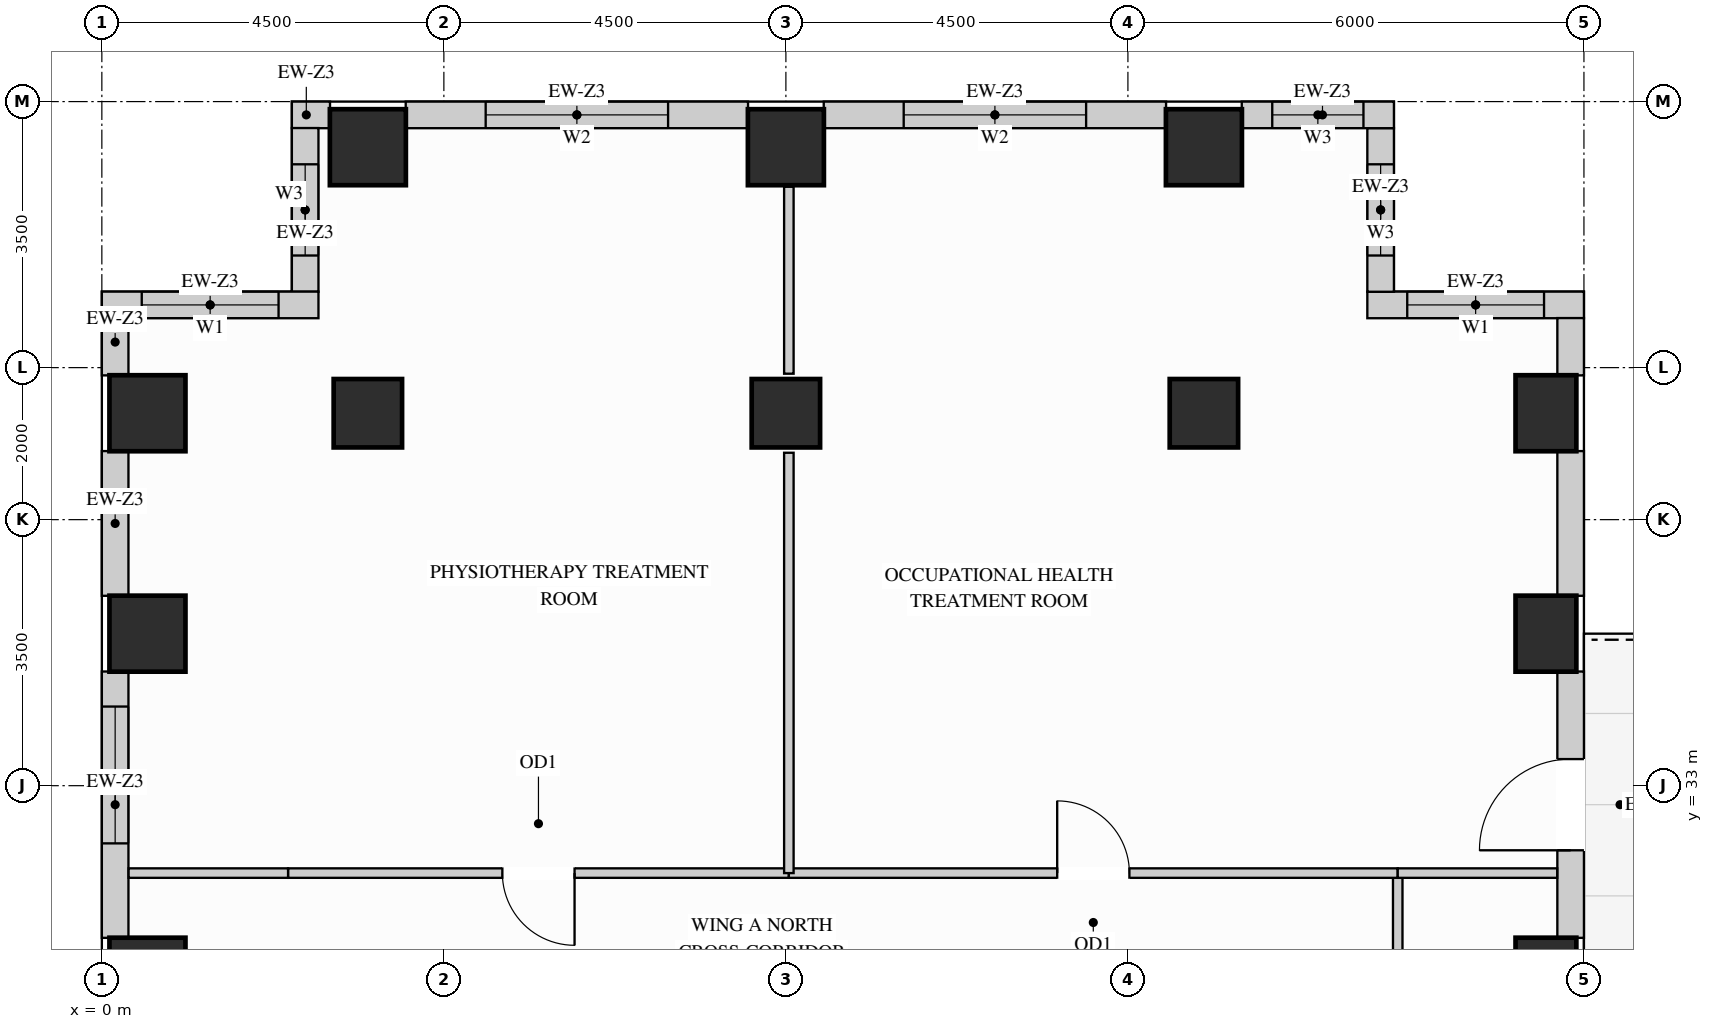
"""IFC4 building model, lengths in metres.
Left out: names, types, materials, properties, quantities, classifications, styles, units other than length and angle.
Written with IfcOpenShell. Run it as: python <this file> out.ifc"""

import sys

from ifc_helpers import new_model, si_unit, direction, frame, frame_2d, origin, origin_2d, place, context, subcontext, project, spatial, rectangle, extrude, source, transform, mapped, element, fill, save


model = new_model("IFC4")
c1 = context("Model", 3, precision=1e-05, world=origin(), true_north=direction((0.0, 1.0)))
c2 = subcontext(c1, "Body", "Model", "MODEL_VIEW")
j1 = project(units=[si_unit("LENGTHUNIT", "METRE"), si_unit("PLANEANGLEUNIT", "RADIAN")], contexts=[c1])
p1 = place(None, origin())
s1 = spatial("IfcSite", under=j1, at=p1, CompositionType="ELEMENT")
p2 = place(p1, origin())
s2 = spatial("IfcBuilding", under=s1, at=p2, CompositionType="ELEMENT")
p3 = place(p2, frame((0.0, 0.0, 157.5)))
s3 = spatial("IfcBuildingStorey", under=s2, at=p3, CompositionType="ELEMENT", Elevation=157.5)
m1 = source(origin(), c2, "Body", "SweptSolid", [
    extrude(rectangle(XDim=0.9, YDim=0.9, at=origin_2d()), origin(), (0.0, 0.0, 1.0), 3.4),
])
for number, where, z_axis, x_axis in (
    (1, (14.5, 37.9, 0.0), (0.0, 0.0, 1.0), (1.0, 0.0, 0.0)),
    (2, (3.5, 37.9, 0.0), (0.0, 0.0, 1.0), (1.0, 0.0, 0.0)),
    (3, (9.0, 37.9, 0.0), (0.0, 0.0, 1.0), (1.0, 0.0, 0.0)),
):
    element("IfcColumn", number, at=place(p3, frame(where, z_axis=z_axis, x_axis=x_axis)), inside=s3, PredefinedType="COLUMN", context=c2, shape_type="MappedRepresentation", body=[
        mapped(m1, transform((0.0, 0.0, 0.0), x_axis=(1.0, 0.0, 0.0), y_axis=(0.0, 1.0, 0.0), z_axis=(0.0, 0.0, 1.0))),
    ])
m2 = source(origin(), c2, "Body", "SweptSolid", [
    extrude(rectangle(XDim=0.8, YDim=1.0, at=origin_2d()), origin(), (0.0, 0.0, 1.0), 3.4),
])
for number, where, z_axis, x_axis in (
    (4, (19.0, 30.5, 0.0), (0.0, 0.0, 1.0), (1.0, 0.0, 0.0)),
    (5, (19.0, 35.0, 0.0), (0.0, 0.0, 1.0), (1.0, 0.0, 0.0)),
    (6, (19.0, 37.9, 0.0), (0.0, 0.0, 1.0), (1.0, 0.0, 0.0)),
):
    element("IfcColumn", number, at=place(p3, frame(where, z_axis=z_axis, x_axis=x_axis)), inside=s3, PredefinedType="COLUMN", context=c2, shape_type="MappedRepresentation", body=[
        mapped(m2, transform((0.0, 0.0, 0.0), x_axis=(1.0, 0.0, 0.0), y_axis=(0.0, 1.0, 0.0), z_axis=(0.0, 0.0, 1.0))),
    ])
m3 = source(origin(), c2, "Body", "SweptSolid", [
    extrude(rectangle(XDim=1.0, YDim=1.0, at=origin_2d()), origin(), (0.0, 0.0, 1.0), 3.4),
])
for number, where, z_axis, x_axis in (
    (7, (14.5, 41.4, 0.0), (0.0, 0.0, 1.0), (1.0, 0.0, 0.0)),
    (8, (3.5, 41.4, 0.0), (0.0, 0.0, 1.0), (1.0, 0.0, 0.0)),
    (9, (9.0, 41.4, 0.0), (0.0, 0.0, 1.0), (1.0, 0.0, 0.0)),
    (10, (0.6, 30.5, 0.0), (0.0, 0.0, 1.0), (1.0, 0.0, 0.0)),
    (11, (0.6, 35.0, 0.0), (0.0, 0.0, 1.0), (1.0, 0.0, 0.0)),
    (12, (0.6, 37.9, 0.0), (0.0, 0.0, 1.0), (1.0, 0.0, 0.0)),
):
    element("IfcColumn", number, at=place(p3, frame(where, z_axis=z_axis, x_axis=x_axis)), inside=s3, PredefinedType="COLUMN", context=c2, shape_type="MappedRepresentation", body=[
        mapped(m3, transform((0.0, 0.0, 0.0), x_axis=(1.0, 0.0, 0.0), y_axis=(0.0, 1.0, 0.0), z_axis=(0.0, 0.0, 1.0))),
    ])
p4 = place(p3, frame((19.5, 39.325, 0.0), z_axis=(0.0, 0.0, 1.0), x_axis=(-1.0, 0.0, 0.0)))
e13 = element("IfcWall", 13, at=p4, inside=s3, PredefinedType="SOLIDWALL", context=c2, shape_type="SweptSolid", body=[
    extrude(rectangle(XDim=2.85, YDim=0.35, at=frame_2d((1.425, 0.0))), origin(), (0.0, 0.0, 1.0), 3.385),
])
p5 = place(p4, frame((0.525, 0.0, 0.78)))
e14 = element("IfcOpeningElement", 14, at=p5, cuts=e13, PredefinedType="OPENING", context=c2, shape_type="SweptSolid", body=[
    extrude(rectangle(XDim=1.8, YDim=2.1, at=frame_2d((0.9, 1.05))), frame((0.0, 0.185, 0.0), z_axis=(0.0, -1.0, 0.0), x_axis=(1.0, 0.0, 0.0)), (0.0, 0.0, 1.0), 0.37),
])
p6 = place(p3, frame((16.825, 39.498, 0.0), z_axis=(0.0, 0.0, 1.0), x_axis=(0.0, 1.0, 0.0)))
e15 = element("IfcWall", 15, at=p6, inside=s3, PredefinedType="SOLIDWALL", context=c2, shape_type="SweptSolid", body=[
    extrude(rectangle(XDim=2.154, YDim=0.35, at=frame_2d((1.077, 0.0))), origin(), (0.0, 0.0, 1.0), 3.385),
])
p7 = place(p6, frame((0.477, 0.0, 0.78)))
e16 = element("IfcOpeningElement", 16, at=p7, cuts=e15, PredefinedType="OPENING", context=c2, shape_type="SweptSolid", body=[
    extrude(rectangle(XDim=1.2, YDim=2.1, at=frame_2d((0.6, 1.05))), frame((0.0, 0.185, 0.0), z_axis=(0.0, -1.0, 0.0), x_axis=(1.0, 0.0, 0.0)), (0.0, 0.0, 1.0), 0.37),
])
p8 = place(p3, frame((17.0, 41.825, 0.0), z_axis=(0.0, 0.0, 1.0), x_axis=(-1.0, 0.0, 0.0)))
e17 = element("IfcWall", 17, at=p8, inside=s3, PredefinedType="SOLIDWALL", context=c2, shape_type="SweptSolid", body=[
    extrude(rectangle(XDim=2.002, YDim=0.35, at=frame_2d((1.001, 0.0))), origin(), (0.0, 0.0, 1.0), 3.385),
])
p9 = place(p8, frame((0.401, 0.0, 0.78)))
e18 = element("IfcOpeningElement", 18, at=p9, cuts=e17, PredefinedType="OPENING", context=c2, shape_type="SweptSolid", body=[
    extrude(rectangle(XDim=1.2, YDim=2.1, at=frame_2d((0.6, 1.05))), frame((0.0, 0.185, 0.0), z_axis=(0.0, -1.0, 0.0), x_axis=(1.0, 0.0, 0.0)), (0.0, 0.0, 1.0), 0.37),
])
p10 = place(p3, frame((14.002, 41.825, 0.0), z_axis=(0.0, 0.0, 1.0), x_axis=(-1.0, 0.0, 0.0)))
e19 = element("IfcWall", 19, at=p10, inside=s3, PredefinedType="SOLIDWALL", context=c2, shape_type="SweptSolid", body=[
    extrude(rectangle(XDim=4.504, YDim=0.35, at=frame_2d((2.252, 0.0))), origin(), (0.0, 0.0, 1.0), 2.612),
])
p11 = place(p10, frame((1.052, 0.0, 0.78)))
e20 = element("IfcOpeningElement", 20, at=p11, cuts=e19, PredefinedType="OPENING", context=c2, shape_type="SweptSolid", body=[
    extrude(rectangle(XDim=2.4, YDim=1.652, at=frame_2d((1.2, 0.826))), frame((0.0, 0.185, 0.0), z_axis=(0.0, -1.0, 0.0), x_axis=(1.0, 0.0, 0.0)), (0.0, 0.0, 1.0), 0.37),
])
p12 = place(p3, frame((8.502, 41.825, 0.0), z_axis=(0.0, 0.0, 1.0), x_axis=(-1.0, 0.0, 0.0)))
e21 = element("IfcWall", 21, at=p12, inside=s3, PredefinedType="SOLIDWALL", context=c2, shape_type="SweptSolid", body=[
    extrude(rectangle(XDim=4.504, YDim=0.35, at=frame_2d((2.252, 0.0))), origin(), (0.0, 0.0, 1.0), 2.612),
])
p13 = place(p12, frame((1.052, 0.0, 0.78)))
e22 = element("IfcOpeningElement", 22, at=p13, cuts=e21, PredefinedType="OPENING", context=c2, shape_type="SweptSolid", body=[
    extrude(rectangle(XDim=2.4, YDim=1.652, at=frame_2d((1.2, 0.826))), frame((0.0, 0.185, 0.0), z_axis=(0.0, -1.0, 0.0), x_axis=(1.0, 0.0, 0.0)), (0.0, 0.0, 1.0), 0.37),
])
m4 = source(origin(), c2, "Body", "SweptSolid", [
    extrude(rectangle(XDim=0.502, YDim=0.35, at=frame_2d((0.251, 0.0))), origin(), (0.0, 0.0, 1.0), 3.385),
])
p14 = place(p3, frame((3.002, 41.825, 0.0), z_axis=(0.0, 0.0, 1.0), x_axis=(-1.0, 0.0, 0.0)))
e23 = element("IfcWall", 23, at=p14, inside=s3, PredefinedType="SOLIDWALL", context=c2, shape_type="MappedRepresentation", body=[
    mapped(m4, transform((0.0, 0.0, 0.0), x_axis=(1.0, 0.0, 0.0), y_axis=(0.0, 1.0, 0.0), z_axis=(0.0, 0.0, 1.0))),
])
p15 = place(p3, frame((2.675, 41.652, 0.0), z_axis=(0.0, 0.0, 1.0), x_axis=(0.0, -1.0, 0.0)))
e24 = element("IfcWall", 24, at=p15, inside=s3, PredefinedType="SOLIDWALL", context=c2, shape_type="SweptSolid", body=[
    extrude(rectangle(XDim=2.154, YDim=0.35, at=frame_2d((1.077, 0.0))), origin(), (0.0, 0.0, 1.0), 3.385),
])
p16 = place(p15, frame((0.477, 0.0, 0.78)))
e25 = element("IfcOpeningElement", 25, at=p16, cuts=e24, PredefinedType="OPENING", context=c2, shape_type="SweptSolid", body=[
    extrude(rectangle(XDim=1.2, YDim=2.1, at=frame_2d((0.6, 1.05))), frame((0.0, 0.185, 0.0), z_axis=(0.0, -1.0, 0.0), x_axis=(1.0, 0.0, 0.0)), (0.0, 0.0, 1.0), 0.37),
])
p17 = place(p3, frame((2.85, 39.325, 0.0), z_axis=(0.0, 0.0, 1.0), x_axis=(-1.0, 0.0, 0.0)))
e26 = element("IfcWall", 26, at=p17, inside=s3, PredefinedType="SOLIDWALL", context=c2, shape_type="SweptSolid", body=[
    extrude(rectangle(XDim=2.85, YDim=0.35, at=frame_2d((1.425, 0.0))), origin(), (0.0, 0.0, 1.0), 3.385),
])
p18 = place(p17, frame((0.525, 0.0, 0.78)))
e27 = element("IfcOpeningElement", 27, at=p18, cuts=e26, PredefinedType="OPENING", context=c2, shape_type="SweptSolid", body=[
    extrude(rectangle(XDim=1.8, YDim=2.1, at=frame_2d((0.9, 1.05))), frame((0.0, 0.185, 0.0), z_axis=(0.0, -1.0, 0.0), x_axis=(1.0, 0.0, 0.0)), (0.0, 0.0, 1.0), 0.37),
])
m5 = source(origin(), c2, "Body", "SweptSolid", [
    extrude(rectangle(XDim=0.754, YDim=0.35, at=frame_2d((0.377, 0.0))), origin(), (0.0, 0.0, 1.0), 3.385),
])
p19 = place(p3, frame((0.175, 39.152, 0.0), z_axis=(0.0, 0.0, 1.0), x_axis=(0.0, -1.0, 0.0)))
e28 = element("IfcWall", 28, at=p19, inside=s3, PredefinedType="SOLIDWALL", context=c2, shape_type="MappedRepresentation", body=[
    mapped(m5, transform((0.0, 0.0, 0.0), x_axis=(1.0, 0.0, 0.0), y_axis=(0.0, 1.0, 0.0), z_axis=(0.0, 0.0, 1.0))),
])
m6 = source(origin(), c2, "Body", "SweptSolid", [
    extrude(rectangle(XDim=1.904, YDim=0.35, at=frame_2d((0.952, 0.0))), origin(), (0.0, 0.0, 1.0), 2.612),
])
p20 = place(p3, frame((0.175, 37.402, 0.0), z_axis=(0.0, 0.0, 1.0), x_axis=(0.0, -1.0, 0.0)))
e29 = element("IfcWall", 29, at=p20, inside=s3, PredefinedType="SOLIDWALL", context=c2, shape_type="MappedRepresentation", body=[
    mapped(m6, transform((0.0, 0.0, 0.0), x_axis=(1.0, 0.0, 0.0), y_axis=(0.0, 1.0, 0.0), z_axis=(0.0, 0.0, 1.0))),
])
p21 = place(p3, frame((0.175, 34.502, 0.0), z_axis=(0.0, 0.0, 1.0), x_axis=(0.0, -1.0, 0.0)))
e30 = element("IfcWall", 30, at=p21, inside=s3, PredefinedType="SOLIDWALL", context=c2, shape_type="SweptSolid", body=[
    extrude(rectangle(XDim=3.504, YDim=0.35, at=frame_2d((1.752, 0.0))), origin(), (0.0, 0.0, 1.0), 2.612),
])
p22 = place(p21, frame((0.461, 0.0, 0.78)))
e31 = element("IfcOpeningElement", 31, at=p22, cuts=e30, PredefinedType="OPENING", context=c2, shape_type="SweptSolid", body=[
    extrude(rectangle(XDim=1.8, YDim=1.652, at=frame_2d((0.9, 0.826))), frame((0.0, 0.185, 0.0), z_axis=(0.0, -1.0, 0.0), x_axis=(1.0, 0.0, 0.0)), (0.0, 0.0, 1.0), 0.37),
])
p23 = place(p3, frame((19.325, 30.998, 0.0), z_axis=(0.0, 0.0, 1.0), x_axis=(0.0, 1.0, 0.0)))
e32 = element("IfcWall", 32, at=p23, inside=s3, PredefinedType="SOLIDWALL", context=c2, shape_type="SweptSolid", body=[
    extrude(rectangle(XDim=3.504, YDim=0.35, at=frame_2d((1.752, 0.0))), origin(), (0.0, 0.0, 1.0), 2.612),
])
p24 = place(p23, frame((1.152, 0.0, 0.0)))
e33 = element("IfcOpeningElement", 33, at=p24, cuts=e32, PredefinedType="OPENING", context=c2, shape_type="SweptSolid", body=[
    extrude(rectangle(XDim=1.2, YDim=2.15, at=frame_2d((0.6, 1.075))), frame((0.0, 0.185, 0.0), z_axis=(0.0, -1.0, 0.0), x_axis=(1.0, 0.0, 0.0)), (0.0, 0.0, 1.0), 0.37),
])
p25 = place(p3, frame((19.325, 35.498, 0.0), z_axis=(0.0, 0.0, 1.0), x_axis=(0.0, 1.0, 0.0)))
e34 = element("IfcWall", 34, at=p25, inside=s3, PredefinedType="SOLIDWALL", context=c2, shape_type="MappedRepresentation", body=[
    mapped(m6, transform((0.0, 0.0, 0.0), x_axis=(1.0, 0.0, 0.0), y_axis=(0.0, 1.0, 0.0), z_axis=(0.0, 0.0, 1.0))),
])
p26 = place(p3, frame((19.325, 38.398, 0.0), z_axis=(0.0, 0.0, 1.0), x_axis=(0.0, 1.0, 0.0)))
e35 = element("IfcWall", 35, at=p26, inside=s3, PredefinedType="SOLIDWALL", context=c2, shape_type="MappedRepresentation", body=[
    mapped(m5, transform((0.0, 0.0, 0.0), x_axis=(1.0, 0.0, 0.0), y_axis=(0.0, 1.0, 0.0), z_axis=(0.0, 0.0, 1.0))),
])
p27 = place(p3, frame((17.05, 26.05, 0.0), z_axis=(0.0, 0.0, 1.0), x_axis=(0.0, 1.0, 0.0)))
e36 = element("IfcWall", 36, at=p27, inside=s3, PredefinedType="PARTITIONING", context=c2, shape_type="SweptSolid", body=[
    extrude(rectangle(XDim=5.8, YDim=0.125, at=frame_2d((2.9, 0.0))), origin(), (0.0, 0.0, 1.0), 3.385),
])
p28 = place(p27, frame((2.425, 0.0, 0.0)))
e37 = element("IfcOpeningElement", 37, at=p28, cuts=e36, PredefinedType="OPENING", context=c2, shape_type="SweptSolid", body=[
    extrude(rectangle(XDim=0.95, YDim=2.15, at=frame_2d((0.475, 1.075))), frame((0.0, 0.073, 0.0), z_axis=(0.0, -1.0, 0.0), x_axis=(1.0, 0.0, 0.0)), (0.0, 0.0, 1.0), 0.145),
])
p29 = place(p3, frame((2.45, 31.85, 0.0), z_axis=(0.0, 0.0, 1.0), x_axis=(1.0, 0.0, 0.0)))
e38 = element("IfcWall", 38, at=p29, inside=s3, PredefinedType="PARTITIONING", context=c2, shape_type="SweptSolid", body=[
    extrude(rectangle(XDim=6.589, YDim=0.125, at=frame_2d((3.294, 0.0))), origin(), (0.0, 0.0, 1.0), 2.848),
])
p30 = place(p29, frame((2.82, 0.0, 0.0)))
e39 = element("IfcOpeningElement", 39, at=p30, cuts=e38, PredefinedType="OPENING", context=c2, shape_type="SweptSolid", body=[
    extrude(rectangle(XDim=0.95, YDim=2.15, at=frame_2d((0.475, 1.075))), frame((0.0, 0.073, 0.0), z_axis=(0.0, -1.0, 0.0), x_axis=(1.0, 0.0, 0.0)), (0.0, 0.0, 1.0), 0.145),
])
p31 = place(p3, frame((9.039, 31.85, 0.0), z_axis=(0.0, 0.0, 1.0), x_axis=(1.0, 0.0, 0.0)))
e40 = element("IfcWall", 40, at=p31, inside=s3, PredefinedType="PARTITIONING", context=c2, shape_type="SweptSolid", body=[
    extrude(rectangle(XDim=8.011, YDim=0.125, at=frame_2d((4.005, 0.0))), origin(), (0.0, 0.0, 1.0), 2.848),
])
p32 = place(p31, frame((3.531, 0.0, 0.0)))
e41 = element("IfcOpeningElement", 41, at=p32, cuts=e40, PredefinedType="OPENING", context=c2, shape_type="SweptSolid", body=[
    extrude(rectangle(XDim=0.95, YDim=2.15, at=frame_2d((0.475, 1.075))), frame((0.0, 0.073, 0.0), z_axis=(0.0, -1.0, 0.0), x_axis=(1.0, 0.0, 0.0)), (0.0, 0.0, 1.0), 0.145),
])
m7 = source(origin(), c2, "Body", "SweptSolid", [
    extrude(rectangle(XDim=2.098, YDim=0.125, at=frame_2d((1.049, 0.0))), origin(), (0.0, 0.0, 1.0), 2.848),
])
for number, where, z_axis, x_axis in (
    (42, (17.05, 31.85, 0.0), (0.0, 0.0, 1.0), (1.0, 0.0, 0.0)),
    (43, (0.352, 31.85, 0.0), (0.0, 0.0, 1.0), (1.0, 0.0, 0.0)),
):
    element("IfcWall", number, at=place(p3, frame(where, z_axis=z_axis, x_axis=x_axis)), inside=s3, PredefinedType="PARTITIONING", context=c2, shape_type="MappedRepresentation", body=[
        mapped(m7, transform((0.0, 0.0, 0.0), x_axis=(1.0, 0.0, 0.0), y_axis=(0.0, 1.0, 0.0), z_axis=(0.0, 0.0, 1.0))),
    ])
m8 = source(origin(), c2, "Body", "SweptSolid", [
    extrude(rectangle(XDim=5.53, YDim=0.125, at=frame_2d((2.765, 0.0))), origin(), (0.0, 0.0, 1.0), 3.385),
])
p33 = place(p3, frame((9.039, 31.85, 0.0), z_axis=(0.0, 0.0, 1.0), x_axis=(0.0, 1.0, 0.0)))
e44 = element("IfcWall", 44, at=p33, inside=s3, PredefinedType="PARTITIONING", context=c2, shape_type="MappedRepresentation", body=[
    mapped(m8, transform((0.0, 0.0, 0.0), x_axis=(1.0, 0.0, 0.0), y_axis=(0.0, 1.0, 0.0), z_axis=(0.0, 0.0, 1.0))),
])
m9 = source(origin(), c2, "Body", "SweptSolid", [
    extrude(rectangle(XDim=2.46, YDim=0.125, at=frame_2d((1.23, 0.0))), origin(), (0.0, 0.0, 1.0), 2.773),
])
p34 = place(p3, frame((9.039, 38.42, 0.0), z_axis=(0.0, 0.0, 1.0), x_axis=(0.0, 1.0, 0.0)))
e45 = element("IfcWall", 45, at=p34, inside=s3, PredefinedType="PARTITIONING", context=c2, shape_type="MappedRepresentation", body=[
    mapped(m9, transform((0.0, 0.0, 0.0), x_axis=(1.0, 0.0, 0.0), y_axis=(0.0, 1.0, 0.0), z_axis=(0.0, 0.0, 1.0))),
])
m10 = source(origin(), c2, "Body", "SweptSolid", [
    extrude(rectangle(XDim=1.2, YDim=2.15, at=frame_2d((0.6, 1.075))), frame((0.0, 0.025, 0.0), z_axis=(0.0, -1.0, 0.0), x_axis=(1.0, 0.0, 0.0)), (0.0, 0.0, 1.0), 0.05),
])
p35 = place(p24, frame((1.2, 0.0, 0.0), z_axis=(0.0, 0.0, 1.0), x_axis=(-1.0, 0.0, 0.0)))
e46 = element("IfcDoor", 46, at=p35, inside=s3, OperationType="SINGLE_SWING_LEFT", PredefinedType="DOOR", context=c2, shape_type="MappedRepresentation", body=[
    mapped(m10, transform((0.0, 0.0, 0.0), x_axis=(1.0, 0.0, 0.0), y_axis=(0.0, 1.0, 0.0), z_axis=(0.0, 0.0, 1.0))),
])
fill(e33, e46)
m11 = source(origin(), c2, "Body", "SweptSolid", [
    extrude(rectangle(XDim=0.95, YDim=2.15, at=frame_2d((0.475, 1.075))), frame((0.0, 0.025, 0.0), z_axis=(0.0, -1.0, 0.0), x_axis=(1.0, 0.0, 0.0)), (0.0, 0.0, 1.0), 0.05),
])
p36 = place(p30, origin())
e47 = element("IfcDoor", 47, at=p36, inside=s3, OperationType="SINGLE_SWING_RIGHT", PredefinedType="DOOR", context=c2, shape_type="MappedRepresentation", body=[
    mapped(m11, transform((0.0, 0.0, 0.0), x_axis=(1.0, 0.0, 0.0), y_axis=(0.0, 1.0, 0.0), z_axis=(0.0, 0.0, 1.0))),
])
fill(e39, e47)
p37 = place(p32, origin())
e48 = element("IfcDoor", 48, at=p37, inside=s3, OperationType="SINGLE_SWING_LEFT", PredefinedType="DOOR", context=c2, shape_type="MappedRepresentation", body=[
    mapped(m11, transform((0.0, 0.0, 0.0), x_axis=(1.0, 0.0, 0.0), y_axis=(0.0, 1.0, 0.0), z_axis=(0.0, 0.0, 1.0))),
])
fill(e41, e48)
m12 = source(origin(), c2, "Body", "SweptSolid", [
    extrude(rectangle(XDim=1.8, YDim=2.1, at=frame_2d((0.9, 1.05))), frame((0.0, 0.03, 0.0), z_axis=(0.0, -1.0, 0.0), x_axis=(1.0, 0.0, 0.0)), (0.0, 0.0, 1.0), 0.06),
])
p38 = place(p5, origin())
e49 = element("IfcWindow", 49, at=p38, inside=s3, PartitioningType="SINGLE_PANEL", PredefinedType="WINDOW", context=c2, shape_type="MappedRepresentation", body=[
    mapped(m12, transform((0.0, 0.0, 0.0), x_axis=(1.0, 0.0, 0.0), y_axis=(0.0, 1.0, 0.0), z_axis=(0.0, 0.0, 1.0))),
])
fill(e14, e49)
p39 = place(p18, origin())
e50 = element("IfcWindow", 50, at=p39, inside=s3, PartitioningType="SINGLE_PANEL", PredefinedType="WINDOW", context=c2, shape_type="MappedRepresentation", body=[
    mapped(m12, transform((0.0, 0.0, 0.0), x_axis=(1.0, 0.0, 0.0), y_axis=(0.0, 1.0, 0.0), z_axis=(0.0, 0.0, 1.0))),
])
fill(e27, e50)
m13 = source(origin(), c2, "Body", "SweptSolid", [
    extrude(rectangle(XDim=1.8, YDim=1.652, at=frame_2d((0.9, 0.826))), frame((0.0, 0.03, 0.0), z_axis=(0.0, -1.0, 0.0), x_axis=(1.0, 0.0, 0.0)), (0.0, 0.0, 1.0), 0.06),
])
p40 = place(p22, origin())
e51 = element("IfcWindow", 51, at=p40, inside=s3, PartitioningType="SINGLE_PANEL", PredefinedType="WINDOW", context=c2, shape_type="MappedRepresentation", body=[
    mapped(m13, transform((0.0, 0.0, 0.0), x_axis=(1.0, 0.0, 0.0), y_axis=(0.0, 1.0, 0.0), z_axis=(0.0, 0.0, 1.0))),
])
fill(e31, e51)
m14 = source(origin(), c2, "Body", "SweptSolid", [
    extrude(rectangle(XDim=2.4, YDim=1.652, at=frame_2d((1.2, 0.826))), frame((0.0, 0.03, 0.0), z_axis=(0.0, -1.0, 0.0), x_axis=(1.0, 0.0, 0.0)), (0.0, 0.0, 1.0), 0.06),
])
p41 = place(p11, origin())
e52 = element("IfcWindow", 52, at=p41, inside=s3, PartitioningType="SINGLE_PANEL", PredefinedType="WINDOW", context=c2, shape_type="MappedRepresentation", body=[
    mapped(m14, transform((0.0, 0.0, 0.0), x_axis=(1.0, 0.0, 0.0), y_axis=(0.0, 1.0, 0.0), z_axis=(0.0, 0.0, 1.0))),
])
fill(e20, e52)
p42 = place(p13, origin())
e53 = element("IfcWindow", 53, at=p42, inside=s3, PartitioningType="SINGLE_PANEL", PredefinedType="WINDOW", context=c2, shape_type="MappedRepresentation", body=[
    mapped(m14, transform((0.0, 0.0, 0.0), x_axis=(1.0, 0.0, 0.0), y_axis=(0.0, 1.0, 0.0), z_axis=(0.0, 0.0, 1.0))),
])
fill(e22, e53)
m15 = source(origin(), c2, "Body", "SweptSolid", [
    extrude(rectangle(XDim=1.2, YDim=2.1, at=frame_2d((0.6, 1.05))), frame((0.0, 0.03, 0.0), z_axis=(0.0, -1.0, 0.0), x_axis=(1.0, 0.0, 0.0)), (0.0, 0.0, 1.0), 0.06),
])
p43 = place(p7, origin())
e54 = element("IfcWindow", 54, at=p43, inside=s3, PartitioningType="SINGLE_PANEL", PredefinedType="WINDOW", context=c2, shape_type="MappedRepresentation", body=[
    mapped(m15, transform((0.0, 0.0, 0.0), x_axis=(1.0, 0.0, 0.0), y_axis=(0.0, 1.0, 0.0), z_axis=(0.0, 0.0, 1.0))),
])
fill(e16, e54)
p44 = place(p9, origin())
e55 = element("IfcWindow", 55, at=p44, inside=s3, PartitioningType="SINGLE_PANEL", PredefinedType="WINDOW", context=c2, shape_type="MappedRepresentation", body=[
    mapped(m15, transform((0.0, 0.0, 0.0), x_axis=(1.0, 0.0, 0.0), y_axis=(0.0, 1.0, 0.0), z_axis=(0.0, 0.0, 1.0))),
])
fill(e18, e55)
p45 = place(p16, origin())
e56 = element("IfcWindow", 56, at=p45, inside=s3, PartitioningType="SINGLE_PANEL", PredefinedType="WINDOW", context=c2, shape_type="MappedRepresentation", body=[
    mapped(m15, transform((0.0, 0.0, 0.0), x_axis=(1.0, 0.0, 0.0), y_axis=(0.0, 1.0, 0.0), z_axis=(0.0, 0.0, 1.0))),
])
fill(e25, e56)
save(model, sys.argv[1])
